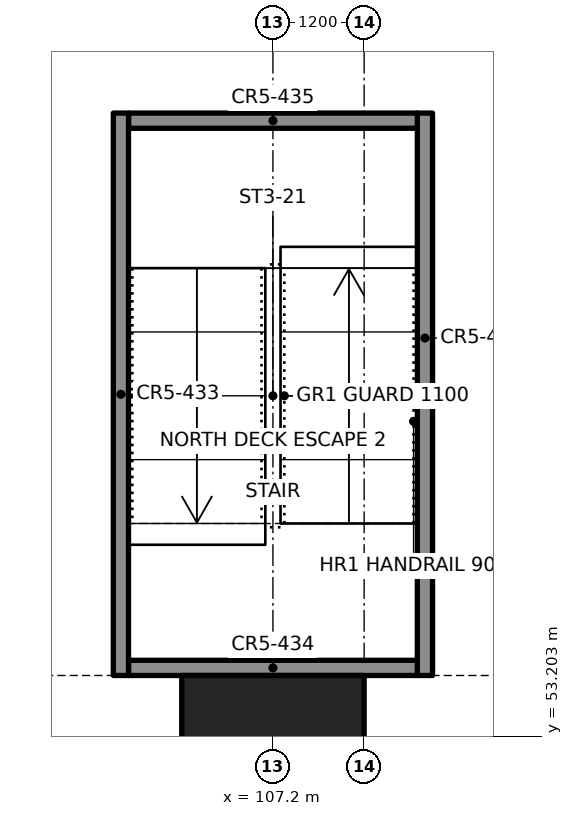
"""IFC4 building model, lengths in metres.
Left out: names, types, materials, properties, quantities, classifications, styles, units other than length and angle.
Written with IfcOpenShell. Run it as: python <this file> out.ifc"""

import sys

from ifc_helpers import new_model, si_unit, direction, frame, frame_2d, origin, origin_2d, place, context, subcontext, project, spatial, rectangle, extrude, element, save


model = new_model("IFC4")
c1 = context("Model", 3, precision=1e-05, world=origin(), true_north=direction((0.0, 1.0)))
c2 = subcontext(c1, "Body", "Model", "MODEL_VIEW")
j1 = project(units=[si_unit("LENGTHUNIT", "METRE"), si_unit("PLANEANGLEUNIT", "RADIAN")], contexts=[c1])
p1 = place(None, origin())
s1 = spatial("IfcSite", under=j1, at=p1, CompositionType="ELEMENT")
p2 = place(p1, origin())
s2 = spatial("IfcBuilding", under=s1, at=p2, CompositionType="ELEMENT")
p3 = place(p2, frame((0.0, 0.0, 4.4)))
s3 = spatial("IfcBuildingStorey", under=s2, at=p3, CompositionType="ELEMENT", Elevation=4.4)
p4 = place(p3, frame((107.2, 52.8, 0.0), z_axis=(0.0, 0.0, 1.0), x_axis=(1.0, 0.0, 0.0)))
e1 = element("IfcColumn", 1, at=p4, inside=s3, PredefinedType="COLUMN", context=c2, shape_type="SweptSolid", body=[
    extrude(rectangle(XDim=2.4, YDim=2.4, at=origin_2d()), origin(), (0.0, 0.0, 1.0), 4.4),
])
for number, where, z_axis, x_axis in (
    (2, (105.2, 54.0, 0.0), (0.0, 0.0, 1.0), (0.0, 1.0, 0.0)),
    (3, (109.2, 61.4, 0.0), (0.0, 0.0, 1.0), (0.0, -1.0, 0.0)),
):
    element("IfcWall", number, at=place(p3, frame(where, z_axis=z_axis, x_axis=x_axis)), inside=s3, PredefinedType="SOLIDWALL", context=c2, shape_type="SweptSolid", body=[
        extrude(rectangle(XDim=7.4, YDim=0.2, at=frame_2d((3.7, 0.0))), origin(), (0.0, 0.0, 1.0), 4.4),
    ])
for number, where, z_axis, x_axis in (
    (4, (105.3, 54.1, 0.0), (0.0, 0.0, 1.0), (1.0, 0.0, 0.0)),
    (5, (105.3, 61.3, 0.0), (0.0, 0.0, 1.0), (1.0, 0.0, 0.0)),
):
    element("IfcWall", number, at=place(p3, frame(where, z_axis=z_axis, x_axis=x_axis)), inside=s3, PredefinedType="SOLIDWALL", context=c2, shape_type="SweptSolid", body=[
        extrude(rectangle(XDim=3.8, YDim=0.2, at=frame_2d((1.9, 0.0))), origin(), (0.0, 0.0, 1.0), 4.4),
    ])
save(model, sys.argv[1])
